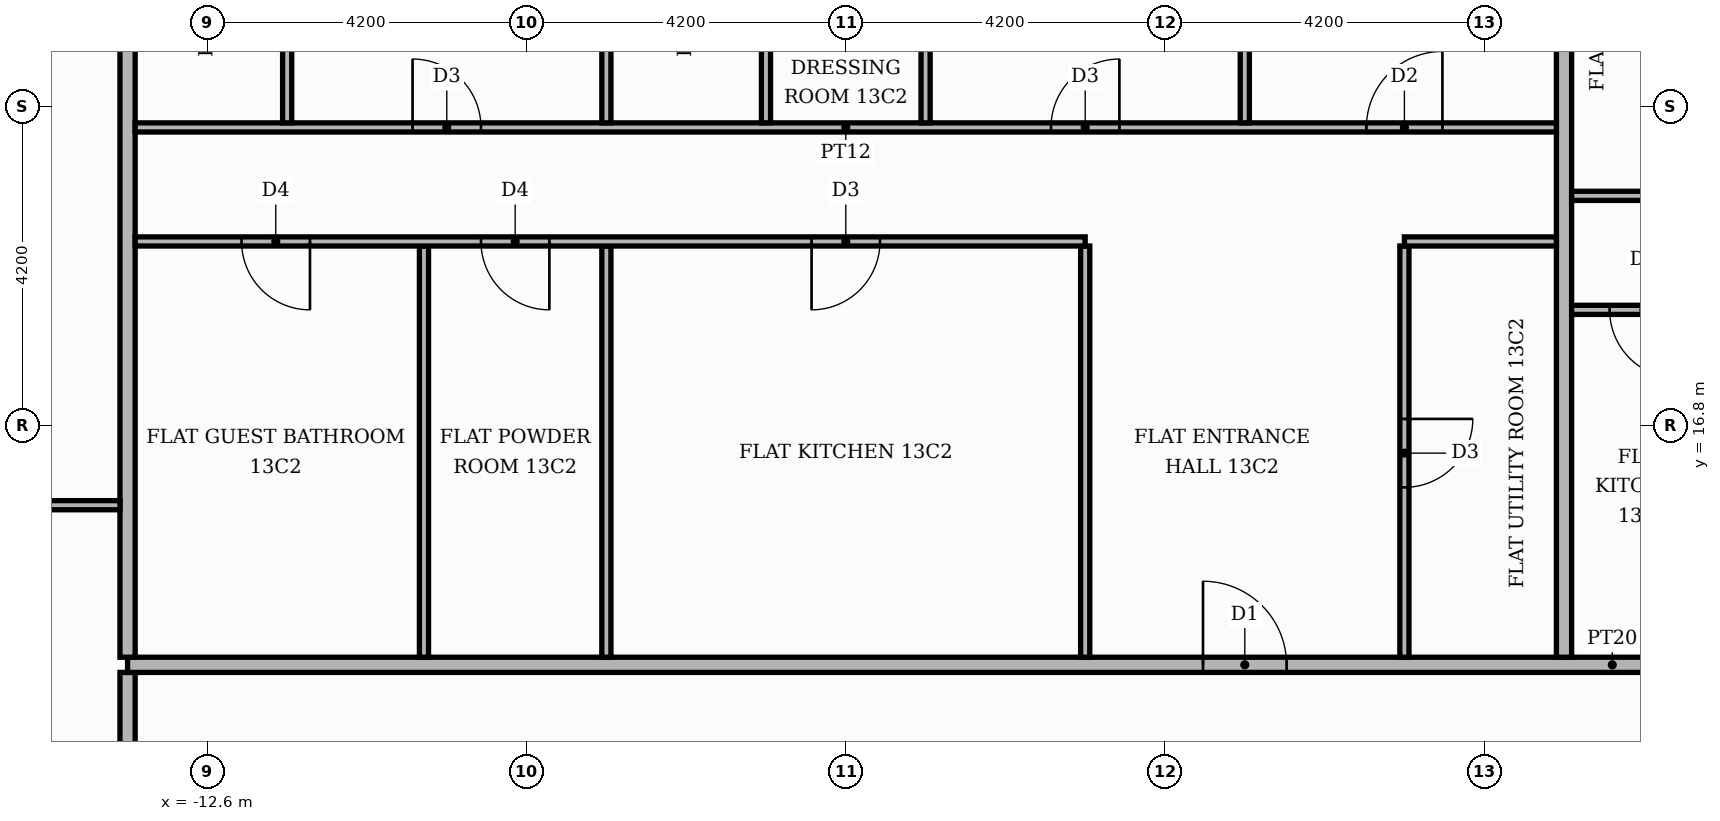
"""IFC4 building model, lengths in metres.
Left out: names, types, materials, properties, quantities, classifications, styles, units other than length and angle.
Written with IfcOpenShell. Run it as: python <this file> out.ifc"""

import sys

from ifc_helpers import new_model, si_unit, direction, frame, frame_2d, origin, place, context, subcontext, project, spatial, rectangle, extrude, element, fill, save


model = new_model("IFC4")
c1 = context("Model", 3, precision=1e-05, world=origin(), true_north=direction((0.0, 1.0)))
c2 = subcontext(c1, "Body", "Model", "MODEL_VIEW")
j1 = project(units=[si_unit("LENGTHUNIT", "METRE"), si_unit("PLANEANGLEUNIT", "RADIAN")], contexts=[c1])
p1 = place(None, origin())
s1 = spatial("IfcSite", under=j1, at=p1, CompositionType="ELEMENT")
p2 = place(p1, origin())
s2 = spatial("IfcBuilding", under=s1, at=p2, CompositionType="ELEMENT")
p3 = place(p2, frame((0.0, 0.0, 58.2)))
s3 = spatial("IfcBuildingStorey", under=s2, at=p3, CompositionType="ELEMENT", Elevation=58.2)
p4 = place(p3, frame((-13.65, 5.35, 0.0), z_axis=(0.0, 0.0, 1.0), x_axis=(0.0, 1.0, 0.0)))
e1 = element("IfcWall", 1, at=p4, inside=s3, PredefinedType="PARTITIONING", context=c2, shape_type="SweptSolid", body=[
    extrude(rectangle(XDim=8.2, YDim=0.2, at=frame_2d((4.1, 0.0))), origin(), (0.0, 0.0, 1.0), 3.48),
])
p5 = place(p4, frame((5.65, 0.0, 0.0)))
e2 = element("IfcOpeningElement", 2, at=p5, cuts=e1, PredefinedType="OPENING", context=c2, shape_type="SweptSolid", body=[
    extrude(rectangle(XDim=1.1, YDim=2.4, at=frame_2d((0.55, 1.2))), frame((0.0, 0.11, 0.0), z_axis=(0.0, -1.0, 0.0), x_axis=(1.0, 0.0, 0.0)), (0.0, 0.0, 1.0), 0.22),
])
p6 = place(p3, frame((-13.65, 13.65, 0.0), z_axis=(0.0, 0.0, 1.0), x_axis=(1.0, 0.0, 0.0)))
e3 = element("IfcWall", 3, at=p6, inside=s3, PredefinedType="PARTITIONING", context=c2, shape_type="SweptSolid", body=[
    extrude(rectangle(XDim=39.07, YDim=0.2, at=frame_2d((19.535, 0.0))), origin(), (0.0, 0.0, 1.0), 3.48),
])
p7 = place(p6, frame((24.65, 0.0, 0.0)))
e4 = element("IfcOpeningElement", 4, at=p7, cuts=e3, PredefinedType="OPENING", context=c2, shape_type="SweptSolid", body=[
    extrude(rectangle(XDim=1.1, YDim=2.4, at=frame_2d((0.55, 1.2))), frame((0.0, 0.11, 0.0), z_axis=(0.0, -1.0, 0.0), x_axis=(1.0, 0.0, 0.0)), (0.0, 0.0, 1.0), 0.22),
])
p8 = place(p6, frame((14.15, 0.0, 0.0)))
e5 = element("IfcOpeningElement", 5, at=p8, cuts=e3, PredefinedType="OPENING", context=c2, shape_type="SweptSolid", body=[
    extrude(rectangle(XDim=1.1, YDim=2.4, at=frame_2d((0.55, 1.2))), frame((0.0, 0.11, 0.0), z_axis=(0.0, -1.0, 0.0), x_axis=(1.0, 0.0, 0.0)), (0.0, 0.0, 1.0), 0.22),
])
p9 = place(p3, frame((-13.65, 13.75, 0.0), z_axis=(0.0, 0.0, 1.0), x_axis=(0.0, 1.0, 0.0)))
e6 = element("IfcWall", 6, at=p9, inside=s3, PredefinedType="PARTITIONING", context=c2, shape_type="SweptSolid", body=[
    extrude(rectangle(XDim=11.67, YDim=0.2, at=frame_2d((5.835, 0.0))), origin(), (0.0, 0.0, 1.0), 3.48),
])
for number, where, z_axis, x_axis in (
    (7, (-9.75, 13.75, 0.0), (0.0, 0.0, 1.0), (0.0, 1.0, 0.0)),
    (8, (-7.35, 13.75, 0.0), (0.0, 0.0, 1.0), (0.0, 1.0, 0.0)),
    (9, (-1.05, 13.75, 0.0), (0.0, 0.0, 1.0), (0.0, 1.0, 0.0)),
):
    element("IfcWall", number, at=place(p3, frame(where, z_axis=z_axis, x_axis=x_axis)), inside=s3, PredefinedType="PARTITIONING", context=c2, shape_type="SweptSolid", body=[
        extrude(rectangle(XDim=5.41, YDim=0.12, at=frame_2d((2.705, 0.0))), origin(), (0.0, 0.0, 1.0), 3.48),
    ])
p10 = place(p3, frame((3.15, 13.75, 0.0), z_axis=(0.0, 0.0, 1.0), x_axis=(0.0, 1.0, 0.0)))
e10 = element("IfcWall", 10, at=p10, inside=s3, PredefinedType="PARTITIONING", context=c2, shape_type="SweptSolid", body=[
    extrude(rectangle(XDim=5.41, YDim=0.12, at=frame_2d((2.705, 0.0))), origin(), (0.0, 0.0, 1.0), 3.48),
])
p11 = place(p10, frame((2.235, 0.0, 0.0)))
e11 = element("IfcOpeningElement", 11, at=p11, cuts=e10, PredefinedType="OPENING", context=c2, shape_type="SweptSolid", body=[
    extrude(rectangle(XDim=0.9, YDim=2.1, at=frame_2d((0.45, 1.05))), frame((0.0, 0.07, 0.0), z_axis=(0.0, -1.0, 0.0), x_axis=(1.0, 0.0, 0.0)), (0.0, 0.0, 1.0), 0.14),
])
p12 = place(p3, frame((5.25, 13.75, 0.0), z_axis=(0.0, 0.0, 1.0), x_axis=(0.0, 1.0, 0.0)))
e12 = element("IfcWall", 12, at=p12, inside=s3, PredefinedType="PARTITIONING", context=c2, shape_type="SweptSolid", body=[
    extrude(rectangle(XDim=11.67, YDim=0.2, at=frame_2d((5.835, 0.0))), origin(), (0.0, 0.0, 1.0), 3.48),
])
p13 = place(p3, frame((-20.12, 15.75, 0.0), z_axis=(0.0, 0.0, 1.0), x_axis=(1.0, 0.0, 0.0)))
e13 = element("IfcWall", 13, at=p13, inside=s3, PredefinedType="PARTITIONING", context=c2, shape_type="SweptSolid", body=[
    extrude(rectangle(XDim=6.37, YDim=0.12, at=frame_2d((3.185, 0.0))), origin(), (0.0, 0.0, 1.0), 3.48),
])
p14 = place(p13, frame((2.735, 0.0, 0.0)))
e14 = element("IfcOpeningElement", 14, at=p14, cuts=e13, PredefinedType="OPENING", context=c2, shape_type="SweptSolid", body=[
    extrude(rectangle(XDim=1.0, YDim=2.1, at=frame_2d((0.5, 1.05))), frame((0.0, 0.07, 0.0), z_axis=(0.0, -1.0, 0.0), x_axis=(1.0, 0.0, 0.0)), (0.0, 0.0, 1.0), 0.14),
])
p15 = place(p3, frame((5.35, 18.32, 0.0), z_axis=(0.0, 0.0, 1.0), x_axis=(1.0, 0.0, 0.0)))
e15 = element("IfcWall", 15, at=p15, inside=s3, PredefinedType="PARTITIONING", context=c2, shape_type="SweptSolid", body=[
    extrude(rectangle(XDim=4.1, YDim=0.12, at=frame_2d((2.05, 0.0))), origin(), (0.0, 0.0, 1.0), 3.48),
])
p16 = place(p15, frame((0.5, 0.0, 0.0)))
e16 = element("IfcOpeningElement", 16, at=p16, cuts=e15, PredefinedType="OPENING", context=c2, shape_type="SweptSolid", body=[
    extrude(rectangle(XDim=0.9, YDim=2.1, at=frame_2d((0.45, 1.05))), frame((0.0, 0.07, 0.0), z_axis=(0.0, -1.0, 0.0), x_axis=(1.0, 0.0, 0.0)), (0.0, 0.0, 1.0), 0.14),
])
p17 = place(p3, frame((-13.55, 19.22, 0.0), z_axis=(0.0, 0.0, 1.0), x_axis=(1.0, 0.0, 0.0)))
e17 = element("IfcWall", 17, at=p17, inside=s3, PredefinedType="PARTITIONING", context=c2, shape_type="SweptSolid", body=[
    extrude(rectangle(XDim=12.5, YDim=0.12, at=frame_2d((6.25, 0.0))), origin(), (0.0, 0.0, 1.0), 3.48),
])
p18 = place(p17, frame((8.9, 0.0, 0.0)))
e18 = element("IfcOpeningElement", 18, at=p18, cuts=e17, PredefinedType="OPENING", context=c2, shape_type="SweptSolid", body=[
    extrude(rectangle(XDim=0.9, YDim=2.1, at=frame_2d((0.45, 1.05))), frame((0.0, 0.07, 0.0), z_axis=(0.0, -1.0, 0.0), x_axis=(1.0, 0.0, 0.0)), (0.0, 0.0, 1.0), 0.14),
])
p19 = place(p17, frame((4.55, 0.0, 0.0)))
e19 = element("IfcOpeningElement", 19, at=p19, cuts=e17, PredefinedType="OPENING", context=c2, shape_type="SweptSolid", body=[
    extrude(rectangle(XDim=0.9, YDim=2.1, at=frame_2d((0.45, 1.05))), frame((0.0, 0.07, 0.0), z_axis=(0.0, -1.0, 0.0), x_axis=(1.0, 0.0, 0.0)), (0.0, 0.0, 1.0), 0.14),
])
p20 = place(p17, frame((1.4, 0.0, 0.0)))
e20 = element("IfcOpeningElement", 20, at=p20, cuts=e17, PredefinedType="OPENING", context=c2, shape_type="SweptSolid", body=[
    extrude(rectangle(XDim=0.9, YDim=2.1, at=frame_2d((0.45, 1.05))), frame((0.0, 0.07, 0.0), z_axis=(0.0, -1.0, 0.0), x_axis=(1.0, 0.0, 0.0)), (0.0, 0.0, 1.0), 0.14),
])
p21 = place(p3, frame((3.15, 19.22, 0.0), z_axis=(0.0, 0.0, 1.0), x_axis=(1.0, 0.0, 0.0)))
e21 = element("IfcWall", 21, at=p21, inside=s3, PredefinedType="PARTITIONING", context=c2, shape_type="SweptSolid", body=[
    extrude(rectangle(XDim=2.0, YDim=0.12, at=frame_2d((1.0, 0.0))), origin(), (0.0, 0.0, 1.0), 3.48),
])
p22 = place(p3, frame((5.35, 19.82, 0.0), z_axis=(0.0, 0.0, 1.0), x_axis=(1.0, 0.0, 0.0)))
e22 = element("IfcWall", 22, at=p22, inside=s3, PredefinedType="PARTITIONING", context=c2, shape_type="SweptSolid", body=[
    extrude(rectangle(XDim=11.95, YDim=0.12, at=frame_2d((5.975, 0.0))), origin(), (0.0, 0.0, 1.0), 3.48),
])
p23 = place(p22, frame((8.85, 0.0, 0.0)))
e23 = element("IfcOpeningElement", 23, at=p23, cuts=e22, PredefinedType="OPENING", context=c2, shape_type="SweptSolid", body=[
    extrude(rectangle(XDim=1.0, YDim=2.1, at=frame_2d((0.5, 1.05))), frame((0.0, 0.07, 0.0), z_axis=(0.0, -1.0, 0.0), x_axis=(1.0, 0.0, 0.0)), (0.0, 0.0, 1.0), 0.14),
])
p24 = place(p22, frame((5.75, 0.0, 0.0)))
e24 = element("IfcOpeningElement", 24, at=p24, cuts=e22, PredefinedType="OPENING", context=c2, shape_type="SweptSolid", body=[
    extrude(rectangle(XDim=0.9, YDim=2.1, at=frame_2d((0.45, 1.05))), frame((0.0, 0.07, 0.0), z_axis=(0.0, -1.0, 0.0), x_axis=(1.0, 0.0, 0.0)), (0.0, 0.0, 1.0), 0.14),
])
p25 = place(p3, frame((-13.55, 20.72, 0.0), z_axis=(0.0, 0.0, 1.0), x_axis=(1.0, 0.0, 0.0)))
e25 = element("IfcWall", 25, at=p25, inside=s3, PredefinedType="PARTITIONING", context=c2, shape_type="SweptSolid", body=[
    extrude(rectangle(XDim=18.7, YDim=0.12, at=frame_2d((9.35, 0.0))), origin(), (0.0, 0.0, 1.0), 3.48),
])
p26 = place(p25, frame((16.2, 0.0, 0.0)))
e26 = element("IfcOpeningElement", 26, at=p26, cuts=e25, PredefinedType="OPENING", context=c2, shape_type="SweptSolid", body=[
    extrude(rectangle(XDim=1.0, YDim=2.1, at=frame_2d((0.5, 1.05))), frame((0.0, 0.07, 0.0), z_axis=(0.0, -1.0, 0.0), x_axis=(1.0, 0.0, 0.0)), (0.0, 0.0, 1.0), 0.14),
])
p27 = place(p25, frame((12.05, 0.0, 0.0)))
e27 = element("IfcOpeningElement", 27, at=p27, cuts=e25, PredefinedType="OPENING", context=c2, shape_type="SweptSolid", body=[
    extrude(rectangle(XDim=0.9, YDim=2.1, at=frame_2d((0.45, 1.05))), frame((0.0, 0.07, 0.0), z_axis=(0.0, -1.0, 0.0), x_axis=(1.0, 0.0, 0.0)), (0.0, 0.0, 1.0), 0.14),
])
p28 = place(p25, frame((3.65, 0.0, 0.0)))
e28 = element("IfcOpeningElement", 28, at=p28, cuts=e25, PredefinedType="OPENING", context=c2, shape_type="SweptSolid", body=[
    extrude(rectangle(XDim=0.9, YDim=2.1, at=frame_2d((0.45, 1.05))), frame((0.0, 0.07, 0.0), z_axis=(0.0, -1.0, 0.0), x_axis=(1.0, 0.0, 0.0)), (0.0, 0.0, 1.0), 0.14),
])
p29 = place(p3, frame((-11.55, 20.78, 0.0), z_axis=(0.0, 0.0, 1.0), x_axis=(0.0, 1.0, 0.0)))
e29 = element("IfcWall", 29, at=p29, inside=s3, PredefinedType="PARTITIONING", context=c2, shape_type="SweptSolid", body=[
    extrude(rectangle(XDim=4.64, YDim=0.12, at=frame_2d((2.32, 0.0))), origin(), (0.0, 0.0, 1.0), 3.48),
])
p30 = place(p29, frame((1.99, 0.0, 0.0)))
e30 = element("IfcOpeningElement", 30, at=p30, cuts=e29, PredefinedType="OPENING", context=c2, shape_type="SweptSolid", body=[
    extrude(rectangle(XDim=0.9, YDim=2.1, at=frame_2d((0.45, 1.05))), frame((0.0, 0.07, 0.0), z_axis=(0.0, -1.0, 0.0), x_axis=(1.0, 0.0, 0.0)), (0.0, 0.0, 1.0), 0.14),
])
p31 = place(p3, frame((-7.35, 20.78, 0.0), z_axis=(0.0, 0.0, 1.0), x_axis=(0.0, 1.0, 0.0)))
e31 = element("IfcWall", 31, at=p31, inside=s3, PredefinedType="PARTITIONING", context=c2, shape_type="SweptSolid", body=[
    extrude(rectangle(XDim=4.64, YDim=0.12, at=frame_2d((2.32, 0.0))), origin(), (0.0, 0.0, 1.0), 3.48),
])
p32 = place(p3, frame((-5.25, 20.78, 0.0), z_axis=(0.0, 0.0, 1.0), x_axis=(0.0, 1.0, 0.0)))
e32 = element("IfcWall", 32, at=p32, inside=s3, PredefinedType="PARTITIONING", context=c2, shape_type="SweptSolid", body=[
    extrude(rectangle(XDim=4.64, YDim=0.12, at=frame_2d((2.32, 0.0))), origin(), (0.0, 0.0, 1.0), 3.48),
])
p33 = place(p32, frame((1.99, 0.0, 0.0)))
e33 = element("IfcOpeningElement", 33, at=p33, cuts=e32, PredefinedType="OPENING", context=c2, shape_type="SweptSolid", body=[
    extrude(rectangle(XDim=0.9, YDim=2.1, at=frame_2d((0.45, 1.05))), frame((0.0, 0.07, 0.0), z_axis=(0.0, -1.0, 0.0), x_axis=(1.0, 0.0, 0.0)), (0.0, 0.0, 1.0), 0.14),
])
p34 = place(p3, frame((-3.15, 20.78, 0.0), z_axis=(0.0, 0.0, 1.0), x_axis=(0.0, 1.0, 0.0)))
e34 = element("IfcWall", 34, at=p34, inside=s3, PredefinedType="PARTITIONING", context=c2, shape_type="SweptSolid", body=[
    extrude(rectangle(XDim=4.64, YDim=0.12, at=frame_2d((2.32, 0.0))), origin(), (0.0, 0.0, 1.0), 3.48),
])
p35 = place(p34, frame((1.99, 0.0, 0.0)))
e35 = element("IfcOpeningElement", 35, at=p35, cuts=e34, PredefinedType="OPENING", context=c2, shape_type="SweptSolid", body=[
    extrude(rectangle(XDim=0.9, YDim=2.1, at=frame_2d((0.45, 1.05))), frame((0.0, 0.07, 0.0), z_axis=(0.0, -1.0, 0.0), x_axis=(1.0, 0.0, 0.0)), (0.0, 0.0, 1.0), 0.14),
])
p36 = place(p3, frame((1.05, 20.78, 0.0), z_axis=(0.0, 0.0, 1.0), x_axis=(0.0, 1.0, 0.0)))
e36 = element("IfcWall", 36, at=p36, inside=s3, PredefinedType="PARTITIONING", context=c2, shape_type="SweptSolid", body=[
    extrude(rectangle(XDim=4.64, YDim=0.12, at=frame_2d((2.32, 0.0))), origin(), (0.0, 0.0, 1.0), 3.48),
])
p37 = place(p16, frame((0.9, 0.0, 0.0), z_axis=(0.0, 0.0, 1.0), x_axis=(-1.0, 0.0, 0.0)))
e37 = element("IfcDoor", 37, at=p37, inside=s3, OperationType="SINGLE_SWING_RIGHT", PredefinedType="DOOR", context=c2, shape_type="SweptSolid", body=[
    extrude(rectangle(XDim=0.9, YDim=2.1, at=frame_2d((0.45, 1.05))), frame((0.0, 0.025, 0.0), z_axis=(0.0, -1.0, 0.0), x_axis=(1.0, 0.0, 0.0)), (0.0, 0.0, 1.0), 0.05),
])
fill(e16, e37)
p38 = place(p8, origin())
e38 = element("IfcDoor", 38, at=p38, inside=s3, OperationType="SINGLE_SWING_LEFT", PredefinedType="DOOR", context=c2, shape_type="SweptSolid", body=[
    extrude(rectangle(XDim=1.1, YDim=2.4, at=frame_2d((0.55, 1.2))), frame((0.0, 0.025, 0.0), z_axis=(0.0, -1.0, 0.0), x_axis=(1.0, 0.0, 0.0)), (0.0, 0.0, 1.0), 0.05),
])
fill(e5, e38)
p39 = place(p11, frame((0.9, 0.0, 0.0), z_axis=(0.0, 0.0, 1.0), x_axis=(-1.0, 0.0, 0.0)))
e39 = element("IfcDoor", 39, at=p39, inside=s3, OperationType="SINGLE_SWING_RIGHT", PredefinedType="DOOR", context=c2, shape_type="SweptSolid", body=[
    extrude(rectangle(XDim=0.9, YDim=2.1, at=frame_2d((0.45, 1.05))), frame((0.0, 0.025, 0.0), z_axis=(0.0, -1.0, 0.0), x_axis=(1.0, 0.0, 0.0)), (0.0, 0.0, 1.0), 0.05),
])
fill(e11, e39)
p40 = place(p18, frame((0.9, 0.0, 0.0), z_axis=(0.0, 0.0, 1.0), x_axis=(-1.0, 0.0, 0.0)))
e40 = element("IfcDoor", 40, at=p40, inside=s3, OperationType="SINGLE_SWING_LEFT", PredefinedType="DOOR", context=c2, shape_type="SweptSolid", body=[
    extrude(rectangle(XDim=0.9, YDim=2.1, at=frame_2d((0.45, 1.05))), frame((0.0, 0.025, 0.0), z_axis=(0.0, -1.0, 0.0), x_axis=(1.0, 0.0, 0.0)), (0.0, 0.0, 1.0), 0.05),
])
fill(e18, e40)
p41 = place(p19, frame((0.9, 0.0, 0.0), z_axis=(0.0, 0.0, 1.0), x_axis=(-1.0, 0.0, 0.0)))
e41 = element("IfcDoor", 41, at=p41, inside=s3, OperationType="SINGLE_SWING_RIGHT", PredefinedType="DOOR", context=c2, shape_type="SweptSolid", body=[
    extrude(rectangle(XDim=0.9, YDim=2.1, at=frame_2d((0.45, 1.05))), frame((0.0, 0.025, 0.0), z_axis=(0.0, -1.0, 0.0), x_axis=(1.0, 0.0, 0.0)), (0.0, 0.0, 1.0), 0.05),
])
fill(e19, e41)
p42 = place(p20, frame((0.9, 0.0, 0.0), z_axis=(0.0, 0.0, 1.0), x_axis=(-1.0, 0.0, 0.0)))
e42 = element("IfcDoor", 42, at=p42, inside=s3, OperationType="SINGLE_SWING_RIGHT", PredefinedType="DOOR", context=c2, shape_type="SweptSolid", body=[
    extrude(rectangle(XDim=0.9, YDim=2.1, at=frame_2d((0.45, 1.05))), frame((0.0, 0.025, 0.0), z_axis=(0.0, -1.0, 0.0), x_axis=(1.0, 0.0, 0.0)), (0.0, 0.0, 1.0), 0.05),
])
fill(e20, e42)
p43 = place(p26, origin())
e43 = element("IfcDoor", 43, at=p43, inside=s3, OperationType="SINGLE_SWING_RIGHT", PredefinedType="DOOR", context=c2, shape_type="SweptSolid", body=[
    extrude(rectangle(XDim=1.0, YDim=2.1, at=frame_2d((0.5, 1.05))), frame((0.0, 0.025, 0.0), z_axis=(0.0, -1.0, 0.0), x_axis=(1.0, 0.0, 0.0)), (0.0, 0.0, 1.0), 0.05),
])
fill(e26, e43)
p44 = place(p27, origin())
e44 = element("IfcDoor", 44, at=p44, inside=s3, OperationType="SINGLE_SWING_RIGHT", PredefinedType="DOOR", context=c2, shape_type="SweptSolid", body=[
    extrude(rectangle(XDim=0.9, YDim=2.1, at=frame_2d((0.45, 1.05))), frame((0.0, 0.025, 0.0), z_axis=(0.0, -1.0, 0.0), x_axis=(1.0, 0.0, 0.0)), (0.0, 0.0, 1.0), 0.05),
])
fill(e27, e44)
p45 = place(p28, origin())
e45 = element("IfcDoor", 45, at=p45, inside=s3, OperationType="SINGLE_SWING_LEFT", PredefinedType="DOOR", context=c2, shape_type="SweptSolid", body=[
    extrude(rectangle(XDim=0.9, YDim=2.1, at=frame_2d((0.45, 1.05))), frame((0.0, 0.025, 0.0), z_axis=(0.0, -1.0, 0.0), x_axis=(1.0, 0.0, 0.0)), (0.0, 0.0, 1.0), 0.05),
])
fill(e28, e45)
save(model, sys.argv[1])
